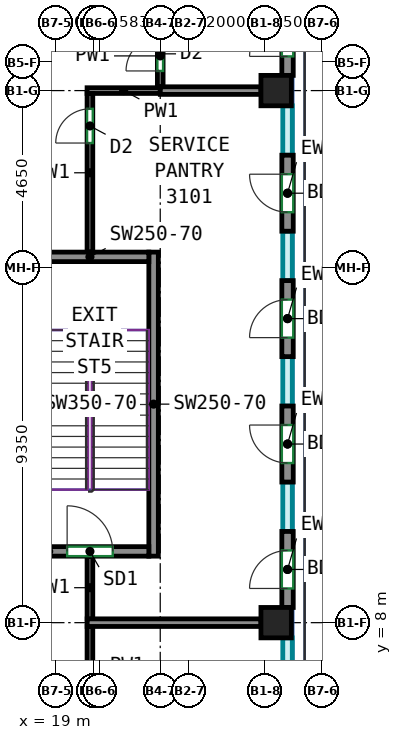
"""IFC4 building model, lengths in metres.
Left out: names, types, materials, properties, quantities, classifications, styles, units other than length and angle.
Written with IfcOpenShell. Run it as: python <this file> out.ifc"""

import sys

from ifc_helpers import new_model, si_unit, direction, frame, frame_2d, origin, origin_2d, place, context, subcontext, project, spatial, rectangle, extrude, source, transform, mapped, element, fill, save


model = new_model("IFC4")
c1 = context("Model", 3, precision=1e-05, world=origin(), true_north=direction((0.0, 1.0)))
c2 = subcontext(c1, "Body", "Model", "MODEL_VIEW")
j1 = project(units=[si_unit("LENGTHUNIT", "METRE"), si_unit("PLANEANGLEUNIT", "RADIAN")], contexts=[c1])
p1 = place(None, origin())
s1 = spatial("IfcSite", under=j1, at=p1, CompositionType="ELEMENT")
p2 = place(p1, origin())
s2 = spatial("IfcBuilding", under=s1, at=p2, CompositionType="ELEMENT")
p3 = place(p2, frame((0.0, 0.0, 138.5)))
s3 = spatial("IfcBuildingStorey", under=s2, at=p3, CompositionType="ELEMENT", Elevation=138.5)
m1 = source(origin(), c2, "Body", "SweptSolid", [
    extrude(rectangle(XDim=0.8, YDim=0.8, at=origin_2d()), origin(), (0.0, 0.0, 1.0), 5.12),
])
for number, where, z_axis, x_axis in (
    (1, (24.8, 8.0, 0.0), (0.0, 0.0, 1.0), (1.0, 0.0, 0.0)),
    (2, (24.8, 22.0, 0.0), (0.0, 0.0, 1.0), (1.0, 0.0, 0.0)),
):
    element("IfcColumn", number, at=place(p3, frame(where, z_axis=z_axis, x_axis=x_axis)), inside=s3, PredefinedType="COLUMN", context=c2, shape_type="MappedRepresentation", body=[
        mapped(m1, transform((0.0, 0.0, 0.0))),
    ])
m2 = source(origin(), c2, "Body", "SweptSolid", [
    extrude(rectangle(XDim=8.0, YDim=0.25, at=frame_2d((4.0, 0.0))), origin(), (0.0, 0.0, 1.0), 5.12),
])
p4 = place(p3, frame((21.575, 9.75, 0.0), z_axis=(0.0, 0.0, 1.0), x_axis=(0.0, 1.0, 0.0)))
e3 = element("IfcWall", 3, at=p4, inside=s3, PredefinedType="SHEAR", context=c2, shape_type="MappedRepresentation", body=[
    mapped(m2, transform((0.0, 0.0, 0.0))),
])
m3 = source(origin(), c2, "Body", "SweptSolid", [
    extrude(rectangle(XDim=3.1, YDim=0.25, at=frame_2d((1.55, 0.0))), origin(), (0.0, 0.0, 1.0), 5.12),
])
p5 = place(p3, frame((18.35, 9.875, 0.0), z_axis=(0.0, 0.0, 1.0), x_axis=(1.0, 0.0, 0.0)))
e4 = element("IfcWall", 4, at=p5, inside=s3, PredefinedType="SHEAR", context=c2, shape_type="MappedRepresentation", body=[
    mapped(m3, transform((0.0, 0.0, 0.0))),
])
p6 = place(p5, frame((0.95, 0.0, 0.0)))
e5 = element("IfcOpeningElement", 5, at=p6, cuts=e4, PredefinedType="OPENING", context=c2, shape_type="SweptSolid", body=[
    extrude(rectangle(XDim=1.2, YDim=2.1, at=frame_2d((0.6, 1.05))), frame((0.0, 0.135, 0.0), z_axis=(0.0, -1.0, 0.0), x_axis=(1.0, 0.0, 0.0)), (0.0, 0.0, 1.0), 0.27),
])
p7 = place(p3, frame((18.35, 17.625, 0.0), z_axis=(0.0, 0.0, 1.0), x_axis=(1.0, 0.0, 0.0)))
e6 = element("IfcWall", 6, at=p7, inside=s3, PredefinedType="SHEAR", context=c2, shape_type="MappedRepresentation", body=[
    mapped(m3, transform((0.0, 0.0, 0.0))),
])
m4 = source(origin(), c2, "Body", "SweptSolid", [
    extrude(rectangle(XDim=2.0, YDim=0.3, at=frame_2d((1.0, 0.0))), origin(), (0.0, 0.0, 1.0), 5.12),
])
p8 = place(p3, frame((25.1, 8.4, 0.0), z_axis=(0.0, 0.0, 1.0), x_axis=(0.0, 1.0, 0.0)))
e7 = element("IfcWall", 7, at=p8, inside=s3, PredefinedType="SOLIDWALL", context=c2, shape_type="MappedRepresentation", body=[
    mapped(m4, transform((0.0, 0.0, 0.0))),
])
p9 = place(p8, frame((0.5, 0.0, 0.0)))
e8 = element("IfcOpeningElement", 8, at=p9, cuts=e7, PredefinedType="OPENING", context=c2, shape_type="SweptSolid", body=[
    extrude(rectangle(XDim=1.0, YDim=2.1, at=frame_2d((0.5, 1.05))), frame((0.0, 0.16, 0.0), z_axis=(0.0, -1.0, 0.0), x_axis=(1.0, 0.0, 0.0)), (0.0, 0.0, 1.0), 0.32),
])
p10 = place(p3, frame((25.1, 11.7, 0.0), z_axis=(0.0, 0.0, 1.0), x_axis=(0.0, 1.0, 0.0)))
e9 = element("IfcWall", 9, at=p10, inside=s3, PredefinedType="SOLIDWALL", context=c2, shape_type="MappedRepresentation", body=[
    mapped(m4, transform((0.0, 0.0, 0.0))),
])
p11 = place(p10, frame((0.5, 0.0, 0.0)))
e10 = element("IfcOpeningElement", 10, at=p11, cuts=e9, PredefinedType="OPENING", context=c2, shape_type="SweptSolid", body=[
    extrude(rectangle(XDim=1.0, YDim=2.1, at=frame_2d((0.5, 1.05))), frame((0.0, 0.16, 0.0), z_axis=(0.0, -1.0, 0.0), x_axis=(1.0, 0.0, 0.0)), (0.0, 0.0, 1.0), 0.32),
])
p12 = place(p3, frame((25.1, 15.0, 0.0), z_axis=(0.0, 0.0, 1.0), x_axis=(0.0, 1.0, 0.0)))
e11 = element("IfcWall", 11, at=p12, inside=s3, PredefinedType="SOLIDWALL", context=c2, shape_type="MappedRepresentation", body=[
    mapped(m4, transform((0.0, 0.0, 0.0))),
])
p13 = place(p12, frame((0.5, 0.0, 0.0)))
e12 = element("IfcOpeningElement", 12, at=p13, cuts=e11, PredefinedType="OPENING", context=c2, shape_type="SweptSolid", body=[
    extrude(rectangle(XDim=1.0, YDim=2.1, at=frame_2d((0.5, 1.05))), frame((0.0, 0.16, 0.0), z_axis=(0.0, -1.0, 0.0), x_axis=(1.0, 0.0, 0.0)), (0.0, 0.0, 1.0), 0.32),
])
p14 = place(p3, frame((25.1, 18.3, 0.0), z_axis=(0.0, 0.0, 1.0), x_axis=(0.0, 1.0, 0.0)))
e13 = element("IfcWall", 13, at=p14, inside=s3, PredefinedType="SOLIDWALL", context=c2, shape_type="MappedRepresentation", body=[
    mapped(m4, transform((0.0, 0.0, 0.0))),
])
p15 = place(p14, frame((0.5, 0.0, 0.0)))
e14 = element("IfcOpeningElement", 14, at=p15, cuts=e13, PredefinedType="OPENING", context=c2, shape_type="SweptSolid", body=[
    extrude(rectangle(XDim=1.0, YDim=2.1, at=frame_2d((0.5, 1.05))), frame((0.0, 0.16, 0.0), z_axis=(0.0, -1.0, 0.0), x_axis=(1.0, 0.0, 0.0)), (0.0, 0.0, 1.0), 0.32),
])
p16 = place(p3, frame((25.1, 22.4, 0.0), z_axis=(0.0, 0.0, 1.0), x_axis=(0.0, 1.0, 0.0)))
e15 = element("IfcWall", 15, at=p16, inside=s3, PredefinedType="SOLIDWALL", context=c2, shape_type="MappedRepresentation", body=[
    mapped(m4, transform((0.0, 0.0, 0.0))),
])
p17 = place(p16, frame((0.5, 0.0, 0.0)))
e16 = element("IfcOpeningElement", 16, at=p17, cuts=e15, PredefinedType="OPENING", context=c2, shape_type="SweptSolid", body=[
    extrude(rectangle(XDim=1.0, YDim=2.1, at=frame_2d((0.5, 1.05))), frame((0.0, 0.16, 0.0), z_axis=(0.0, -1.0, 0.0), x_axis=(1.0, 0.0, 0.0)), (0.0, 0.0, 1.0), 0.32),
])
p18 = place(p3, frame((21.75, 22.1, 0.0), z_axis=(0.0, 0.0, 1.0), x_axis=(0.0, 1.0, 0.0)))
e17 = element("IfcWall", 17, at=p18, inside=s3, PredefinedType="PARTITIONING", context=c2, shape_type="SweptSolid", body=[
    extrude(rectangle(XDim=1.625, YDim=0.15, at=frame_2d((0.812, 0.0))), origin(), (0.0, 0.0, 1.0), 5.12),
])
p19 = place(p18, frame((0.417, 0.0, 0.0)))
e18 = element("IfcOpeningElement", 18, at=p19, cuts=e17, PredefinedType="OPENING", context=c2, shape_type="SweptSolid", body=[
    extrude(rectangle(XDim=0.9, YDim=2.1, at=frame_2d((0.45, 1.05))), frame((0.0, 0.085, 0.0), z_axis=(0.0, -1.0, 0.0), x_axis=(1.0, 0.0, 0.0)), (0.0, 0.0, 1.0), 0.17),
])
p20 = place(p3, frame((19.9, 4.434, 0.0), z_axis=(0.0, 0.0, 1.0), x_axis=(0.0, 1.0, 0.0)))
e19 = element("IfcWall", 19, at=p20, inside=s3, PredefinedType="PARTITIONING", context=c2, shape_type="SweptSolid", body=[
    extrude(rectangle(XDim=3.476, YDim=0.15, at=frame_2d((1.738, 0.0))), origin(), (0.0, 0.0, 1.0), 5.12),
])
p21 = place(p20, frame((0.614, 0.0, 0.0)))
e20 = element("IfcOpeningElement", 20, at=p21, cuts=e19, PredefinedType="OPENING", context=c2, shape_type="SweptSolid", body=[
    extrude(rectangle(XDim=0.9, YDim=2.1, at=frame_2d((0.45, 1.05))), frame((0.0, 0.085, 0.0), z_axis=(0.0, -1.0, 0.0), x_axis=(1.0, 0.0, 0.0)), (0.0, 0.0, 1.0), 0.17),
])
p22 = place(p3, frame((19.825, 22.0, 0.0), z_axis=(0.0, 0.0, 1.0), x_axis=(1.0, 0.0, 0.0)))
e21 = element("IfcWall", 21, at=p22, inside=s3, PredefinedType="PARTITIONING", context=c2, shape_type="SweptSolid", body=[
    extrude(rectangle(XDim=1.925, YDim=0.15, at=frame_2d((0.962, 0.0))), origin(), (0.0, 0.0, 1.0), 5.12),
])
p23 = place(p3, frame((19.9, 17.75, 0.0), z_axis=(0.0, 0.0, 1.0), x_axis=(0.0, 1.0, 0.0)))
e22 = element("IfcWall", 22, at=p23, inside=s3, PredefinedType="PARTITIONING", context=c2, shape_type="SweptSolid", body=[
    extrude(rectangle(XDim=4.175, YDim=0.15, at=frame_2d((2.087, 0.0))), origin(), (0.0, 0.0, 1.0), 5.12),
])
p24 = place(p23, frame((2.87, 0.0, 0.0)))
e23 = element("IfcOpeningElement", 23, at=p24, cuts=e22, PredefinedType="OPENING", context=c2, shape_type="SweptSolid", body=[
    extrude(rectangle(XDim=0.9, YDim=2.1, at=frame_2d((0.45, 1.05))), frame((0.0, 0.085, 0.0), z_axis=(0.0, -1.0, 0.0), x_axis=(1.0, 0.0, 0.0)), (0.0, 0.0, 1.0), 0.17),
])
p25 = place(p3, frame((19.9, 8.09, 0.0), z_axis=(0.0, 0.0, 1.0), x_axis=(0.0, 1.0, 0.0)))
e24 = element("IfcWall", 24, at=p25, inside=s3, PredefinedType="PARTITIONING", context=c2, shape_type="SweptSolid", body=[
    extrude(rectangle(XDim=1.66, YDim=0.15, at=frame_2d((0.83, 0.0))), origin(), (0.0, 0.0, 1.0), 5.12),
])
p26 = place(p3, frame((21.752, 22.0, 0.0), z_axis=(0.0, 0.0, 1.0), x_axis=(1.0, 0.0, 0.0)))
e25 = element("IfcWall", 25, at=p26, inside=s3, PredefinedType="PARTITIONING", context=c2, shape_type="SweptSolid", body=[
    extrude(rectangle(XDim=2.648, YDim=0.2, at=frame_2d((1.324, 0.0))), origin(), (0.0, 0.0, 1.0), 5.12),
])
p27 = place(p3, frame((19.827, 8.0, 0.0), z_axis=(0.0, 0.0, 1.0), x_axis=(1.0, 0.0, 0.0)))
e26 = element("IfcWall", 26, at=p27, inside=s3, PredefinedType="PARTITIONING", context=c2, shape_type="SweptSolid", body=[
    extrude(rectangle(XDim=4.573, YDim=0.2, at=frame_2d((2.287, 0.0))), origin(), (0.0, 0.0, 1.0), 5.12),
])
p28 = place(p9, origin())
e27 = element("IfcDoor", 27, at=p28, inside=s3, OperationType="SINGLE_SWING_LEFT", PredefinedType="DOOR", context=c2, shape_type="SweptSolid", body=[
    extrude(rectangle(XDim=1.0, YDim=2.1, at=frame_2d((0.5, 1.05))), frame((0.0, 0.025, 0.0), z_axis=(0.0, -1.0, 0.0), x_axis=(1.0, 0.0, 0.0)), (0.0, 0.0, 1.0), 0.05),
])
fill(e8, e27)
p29 = place(p11, origin())
e28 = element("IfcDoor", 28, at=p29, inside=s3, OperationType="SINGLE_SWING_RIGHT", PredefinedType="DOOR", context=c2, shape_type="SweptSolid", body=[
    extrude(rectangle(XDim=1.0, YDim=2.1, at=frame_2d((0.5, 1.05))), frame((0.0, 0.025, 0.0), z_axis=(0.0, -1.0, 0.0), x_axis=(1.0, 0.0, 0.0)), (0.0, 0.0, 1.0), 0.05),
])
fill(e10, e28)
p30 = place(p13, origin())
e29 = element("IfcDoor", 29, at=p30, inside=s3, OperationType="SINGLE_SWING_LEFT", PredefinedType="DOOR", context=c2, shape_type="SweptSolid", body=[
    extrude(rectangle(XDim=1.0, YDim=2.1, at=frame_2d((0.5, 1.05))), frame((0.0, 0.025, 0.0), z_axis=(0.0, -1.0, 0.0), x_axis=(1.0, 0.0, 0.0)), (0.0, 0.0, 1.0), 0.05),
])
fill(e12, e29)
p31 = place(p15, origin())
e30 = element("IfcDoor", 30, at=p31, inside=s3, OperationType="SINGLE_SWING_RIGHT", PredefinedType="DOOR", context=c2, shape_type="SweptSolid", body=[
    extrude(rectangle(XDim=1.0, YDim=2.1, at=frame_2d((0.5, 1.05))), frame((0.0, 0.025, 0.0), z_axis=(0.0, -1.0, 0.0), x_axis=(1.0, 0.0, 0.0)), (0.0, 0.0, 1.0), 0.05),
])
fill(e14, e30)
p32 = place(p17, origin())
e31 = element("IfcDoor", 31, at=p32, inside=s3, OperationType="SINGLE_SWING_LEFT", PredefinedType="DOOR", context=c2, shape_type="SweptSolid", body=[
    extrude(rectangle(XDim=1.0, YDim=2.1, at=frame_2d((0.5, 1.05))), frame((0.0, 0.025, 0.0), z_axis=(0.0, -1.0, 0.0), x_axis=(1.0, 0.0, 0.0)), (0.0, 0.0, 1.0), 0.05),
])
fill(e16, e31)
p33 = place(p6, origin())
e32 = element("IfcDoor", 32, at=p33, inside=s3, OperationType="DOUBLE_DOOR_SINGLE_SWING", PredefinedType="DOOR", context=c2, shape_type="SweptSolid", body=[
    extrude(rectangle(XDim=1.2, YDim=2.1, at=frame_2d((0.6, 1.05))), frame((0.0, 0.025, 0.0), z_axis=(0.0, -1.0, 0.0), x_axis=(1.0, 0.0, 0.0)), (0.0, 0.0, 1.0), 0.05),
])
fill(e5, e32)
p34 = place(p24, origin())
e33 = element("IfcDoor", 33, at=p34, inside=s3, OperationType="SINGLE_SWING_LEFT", PredefinedType="DOOR", context=c2, shape_type="SweptSolid", body=[
    extrude(rectangle(XDim=0.9, YDim=2.1, at=frame_2d((0.45, 1.05))), frame((0.0, 0.025, 0.0), z_axis=(0.0, -1.0, 0.0), x_axis=(1.0, 0.0, 0.0)), (0.0, 0.0, 1.0), 0.05),
])
fill(e23, e33)
p35 = place(p19, origin())
e34 = element("IfcDoor", 34, at=p35, inside=s3, OperationType="SINGLE_SWING_LEFT", PredefinedType="DOOR", context=c2, shape_type="SweptSolid", body=[
    extrude(rectangle(XDim=0.9, YDim=2.1, at=frame_2d((0.45, 1.05))), frame((0.0, 0.025, 0.0), z_axis=(0.0, -1.0, 0.0), x_axis=(1.0, 0.0, 0.0)), (0.0, 0.0, 1.0), 0.05),
])
fill(e18, e34)
save(model, sys.argv[1])
